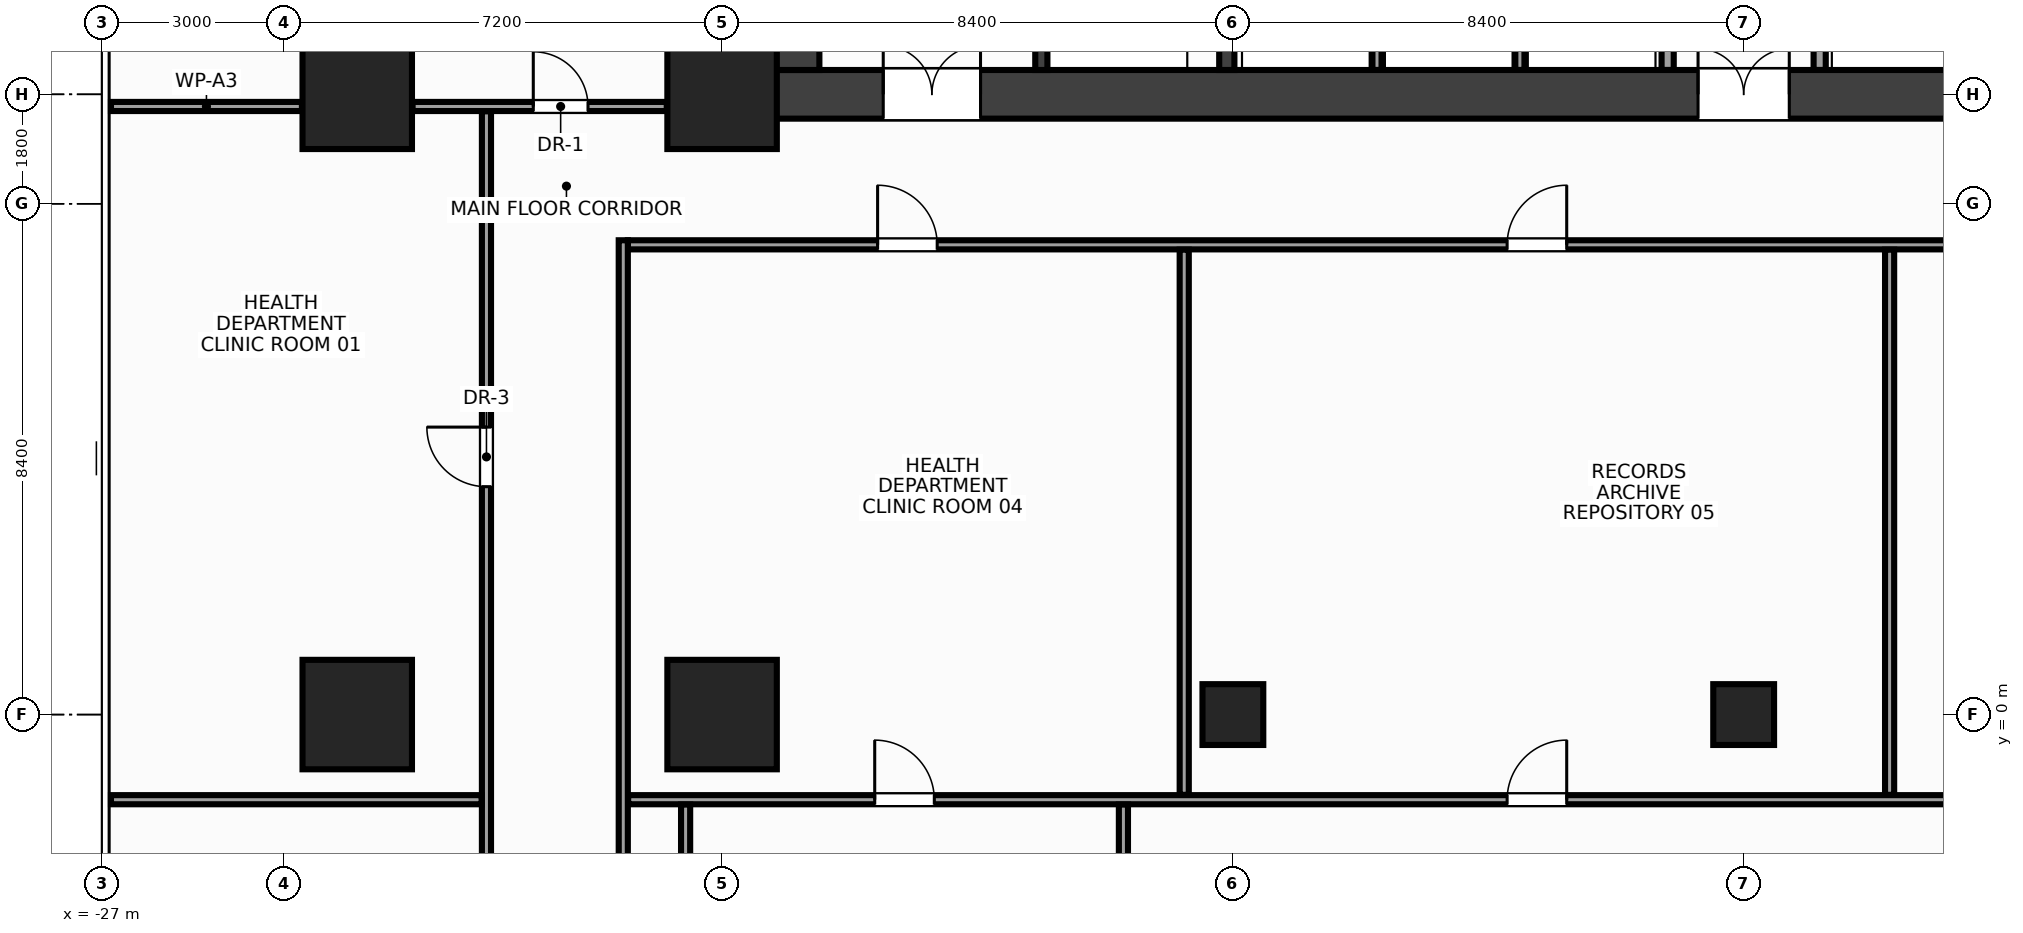
"""IFC4 building model, lengths in metres.
Left out: names, types, materials, properties, quantities, classifications, styles, units other than length and angle.
Written with IfcOpenShell. Run it as: python <this file> out.ifc"""

import sys

from ifc_helpers import new_model, si_unit, direction, frame, frame_2d, origin, origin_with_axes, origin_2d, place, context, subcontext, project, spatial, rectangle, hollow_rectangle, extrude, source, transform, mapped, element, fill, save


model = new_model("IFC4")
c1 = context("Model", 3, precision=1e-05, world=origin(), true_north=direction((0.0, 1.0)))
c2 = subcontext(c1, "Body", "Model", "MODEL_VIEW")
j1 = project(units=[si_unit("LENGTHUNIT", "METRE"), si_unit("PLANEANGLEUNIT", "RADIAN")], contexts=[c1])
p1 = place(None, origin())
s1 = spatial("IfcSite", under=j1, at=p1, CompositionType="ELEMENT")
p2 = place(p1, origin())
s2 = spatial("IfcBuilding", under=s1, at=p2, CompositionType="ELEMENT")
p3 = place(p2, frame((0.0, 0.0, 48.8)))
s3 = spatial("IfcBuildingStorey", under=s2, at=p3, CompositionType="ELEMENT", Elevation=48.8)
m1 = source(origin(), c2, "Body", "SweptSolid", [
    extrude(rectangle(XDim=32.0, YDim=0.8, at=frame_2d((16.0, 0.0))), origin(), (0.0, 0.0, 1.0), 3.6),
])
p4 = place(p3, frame((-16.0, 10.2, 0.0), z_axis=(0.0, 0.0, 1.0), x_axis=(1.0, 0.0, 0.0)))
e1 = element("IfcWall", 1, at=p4, inside=s3, PredefinedType="SHEAR", context=c2, shape_type="MappedRepresentation", body=[
    mapped(m1, transform((0.0, 0.0, 0.0), x_axis=(1.0, 0.0, 0.0), y_axis=(0.0, 1.0, 0.0), z_axis=(0.0, 0.0, 1.0), scale=1.0)),
])
p5 = place(p4, frame((1.85, 0.0, 0.0)))
e2 = element("IfcOpeningElement", 2, at=p5, cuts=e1, PredefinedType="OPENING", context=c2, shape_type="SweptSolid", body=[
    extrude(rectangle(XDim=1.6, YDim=2.15, at=frame_2d((0.8, 1.075))), frame((0.0, 0.412, 0.0), z_axis=(0.0, -1.0, 0.0), x_axis=(1.0, 0.0, 0.0)), (0.0, 0.0, 1.0), 0.824),
])
p6 = place(p4, frame((28.55, 0.0, 0.0)))
e3 = element("IfcOpeningElement", 3, at=p6, cuts=e1, PredefinedType="OPENING", context=c2, shape_type="SweptSolid", body=[
    extrude(rectangle(XDim=1.6, YDim=2.15, at=frame_2d((0.8, 1.075))), frame((0.0, 0.412, 0.0), z_axis=(0.0, -1.0, 0.0), x_axis=(1.0, 0.0, 0.0)), (0.0, 0.0, 1.0), 0.824),
])
p7 = place(p4, frame((15.25, 0.0, 0.0)))
e4 = element("IfcOpeningElement", 4, at=p7, cuts=e1, PredefinedType="OPENING", context=c2, shape_type="SweptSolid", body=[
    extrude(rectangle(XDim=1.5, YDim=2.2, at=frame_2d((0.75, 1.1))), frame((0.0, 0.412, 0.0), z_axis=(0.0, -1.0, 0.0), x_axis=(1.0, 0.0, 0.0)), (0.0, 0.0, 1.0), 0.824),
])
m2 = source(origin(), c2, "Body", "SweptSolid", [
    extrude(rectangle(XDim=12.8, YDim=0.8, at=frame_2d((6.4, 0.0))), origin(), (0.0, 0.0, 1.0), 3.6),
])
p8 = place(p3, frame((-15.6, 10.6, 0.0), z_axis=(0.0, 0.0, 1.0), x_axis=(0.0, 1.0, 0.0)))
e5 = element("IfcWall", 5, at=p8, inside=s3, PredefinedType="SHEAR", context=c2, shape_type="MappedRepresentation", body=[
    mapped(m2, transform((0.0, 0.0, 0.0), x_axis=(1.0, 0.0, 0.0), y_axis=(0.0, 1.0, 0.0), z_axis=(0.0, 0.0, 1.0), scale=1.0)),
])
m3 = source(origin(), c2, "Body", "SweptSolid", [
    extrude(rectangle(XDim=12.8, YDim=0.25, at=frame_2d((6.4, 0.0))), origin(), (0.0, 0.0, 1.0), 3.6),
])
p9 = place(p3, frame((-8.5, 10.6, 0.0), z_axis=(0.0, 0.0, 1.0), x_axis=(0.0, 1.0, 0.0)))
e6 = element("IfcWall", 6, at=p9, inside=s3, PredefinedType="SHEAR", context=c2, shape_type="MappedRepresentation", body=[
    mapped(m3, transform((0.0, 0.0, 0.0), x_axis=(1.0, 0.0, 0.0), y_axis=(0.0, 1.0, 0.0), z_axis=(0.0, 0.0, 1.0), scale=1.0)),
])
p10 = place(p9, frame((5.9, 0.0, 0.0)))
e7 = element("IfcOpeningElement", 7, at=p10, cuts=e6, PredefinedType="OPENING", context=c2, shape_type="SweptSolid", body=[
    extrude(rectangle(XDim=0.95, YDim=2.15, at=frame_2d((0.475, 1.075))), frame((0.0, 0.137, 0.0), z_axis=(0.0, -1.0, 0.0), x_axis=(1.0, 0.0, 0.0)), (0.0, 0.0, 1.0), 0.274),
])
m4 = source(origin(), c2, "Body", "SweptSolid", [
    extrude(rectangle(XDim=3.05, YDim=0.2, at=frame_2d((1.525, 0.0))), origin(), (0.0, 0.0, 1.0), 3.6),
])
p11 = place(p3, frame((-11.55, 10.6, 0.0), z_axis=(0.0, 0.0, 1.0), x_axis=(0.0, 1.0, 0.0)))
e8 = element("IfcWall", 8, at=p11, inside=s3, PredefinedType="SHEAR", context=c2, shape_type="MappedRepresentation", body=[
    mapped(m4, transform((0.0, 0.0, 0.0), x_axis=(1.0, 0.0, 0.0), y_axis=(0.0, 1.0, 0.0), z_axis=(0.0, 0.0, 1.0), scale=1.0)),
])
p12 = place(p11, frame((0.9, 0.0, 0.0)))
e9 = element("IfcOpeningElement", 9, at=p12, cuts=e8, PredefinedType="OPENING", context=c2, shape_type="SweptSolid", body=[
    extrude(rectangle(XDim=1.1, YDim=2.15, at=frame_2d((0.55, 1.075))), frame((0.0, 0.112, 0.0), z_axis=(0.0, -1.0, 0.0), x_axis=(1.0, 0.0, 0.0)), (0.0, 0.0, 1.0), 0.224),
])
m5 = source(origin(), c2, "Body", "SweptSolid", [
    extrude(rectangle(XDim=1.8, YDim=1.8, at=origin_2d()), origin(), (0.0, 0.0, 1.0), 3.6),
])
for number, where, z_axis, x_axis in (
    (10, (-16.8, 0.0, 0.0), (0.0, 0.0, 1.0), (1.0, 0.0, 0.0)),
    (11, (-16.8, 10.2, 0.0), (0.0, 0.0, 1.0), (1.0, 0.0, 0.0)),
    (12, (-22.8, 0.0, 0.0), (0.0, 0.0, 1.0), (1.0, 0.0, 0.0)),
    (13, (-22.8, 10.2, 0.0), (0.0, 0.0, 1.0), (1.0, 0.0, 0.0)),
):
    element("IfcColumn", number, at=place(p3, frame(where, z_axis=z_axis, x_axis=x_axis)), inside=s3, PredefinedType="COLUMN", context=c2, shape_type="MappedRepresentation", body=[
        mapped(m5, transform((0.0, 0.0, 0.0), x_axis=(1.0, 0.0, 0.0), y_axis=(0.0, 1.0, 0.0), z_axis=(0.0, 0.0, 1.0), scale=1.0)),
    ])
m6 = source(origin(), c2, "Body", "SweptSolid", [
    extrude(hollow_rectangle(XDim=1.0, YDim=1.0, WallThickness=0.045, at=origin_2d()), origin(), (0.0, 0.0, 1.0), 3.6),
])
p13 = place(p3, frame((-8.4, 0.0, 0.0), z_axis=(0.0, 0.0, 1.0), x_axis=(1.0, 0.0, 0.0)))
e14 = element("IfcColumn", 14, at=p13, inside=s3, PredefinedType="COLUMN", context=c2, shape_type="MappedRepresentation", body=[
    mapped(m6, transform((0.0, 0.0, 0.0), x_axis=(1.0, 0.0, 0.0), y_axis=(0.0, 1.0, 0.0), z_axis=(0.0, 0.0, 1.0), scale=1.0)),
])
m7 = source(origin(), c2, "Body", "SweptSolid", [
    extrude(rectangle(XDim=1.0, YDim=1.0, at=origin_2d()), origin(), (0.0, 0.0, 1.0), 3.6),
])
p14 = place(p3, origin_with_axes())
e15 = element("IfcColumn", 15, at=p14, inside=s3, PredefinedType="COLUMN", context=c2, shape_type="MappedRepresentation", body=[
    mapped(m7, transform((0.0, 0.0, 0.0), x_axis=(1.0, 0.0, 0.0), y_axis=(0.0, 1.0, 0.0), z_axis=(0.0, 0.0, 1.0), scale=1.0)),
])
m8 = source(origin(), c2, "Body", "SweptSolid", [
    extrude(rectangle(XDim=3.34, YDim=0.2, at=frame_2d((1.67, 0.0))), origin(), (0.0, 0.0, 1.0), 3.36),
])
for number, where, z_axis, x_axis in (
    (16, (-1.25, 10.6, 0.0), (0.0, 0.0, 1.0), (0.0, 1.0, 0.0)),
    (17, (1.25, 10.6, 0.0), (0.0, 0.0, 1.0), (0.0, 1.0, 0.0)),
):
    element("IfcWall", number, at=place(p3, frame(where, z_axis=z_axis, x_axis=x_axis)), inside=s3, PredefinedType="PARTITIONING", context=c2, shape_type="MappedRepresentation", body=[
        mapped(m8, transform((0.0, 0.0, 0.0), x_axis=(1.0, 0.0, 0.0), y_axis=(0.0, 1.0, 0.0), z_axis=(0.0, 0.0, 1.0), scale=1.0)),
    ])
m9 = source(origin(), c2, "Body", "SweptSolid", [
    extrude(rectangle(XDim=3.34, YDim=0.15, at=frame_2d((1.67, 0.0))), origin(), (0.0, 0.0, 1.0), 3.36),
])
for number, where, z_axis, x_axis in (
    (18, (-6.03, 10.6, 0.0), (0.0, 0.0, 1.0), (0.0, 1.0, 0.0)),
    (19, (-3.68, 10.6, 0.0), (0.0, 0.0, 1.0), (0.0, 1.0, 0.0)),
):
    element("IfcWall", number, at=place(p3, frame(where, z_axis=z_axis, x_axis=x_axis)), inside=s3, PredefinedType="PARTITIONING", context=c2, shape_type="MappedRepresentation", body=[
        mapped(m9, transform((0.0, 0.0, 0.0), x_axis=(1.0, 0.0, 0.0), y_axis=(0.0, 1.0, 0.0), z_axis=(0.0, 0.0, 1.0), scale=1.0)),
    ])
m10 = source(origin(), c2, "Body", "SweptSolid", [
    extrude(rectangle(XDim=3.14, YDim=0.15, at=frame_2d((1.57, 0.0))), origin(), (0.0, 0.0, 1.0), 2.435),
])
p15 = place(p3, frame((-26.85, 10.0, 0.0), z_axis=(0.0, 0.0, 1.0), x_axis=(1.0, 0.0, 0.0)))
e20 = element("IfcWall", 20, at=p15, inside=s3, PredefinedType="PARTITIONING", context=c2, shape_type="MappedRepresentation", body=[
    mapped(m10, transform((0.0, 0.0, 0.0), x_axis=(1.0, 0.0, 0.0), y_axis=(0.0, 1.0, 0.0), z_axis=(0.0, 0.0, 1.0), scale=1.0)),
])
m11 = source(origin(), c2, "Body", "SweptSolid", [
    extrude(rectangle(XDim=4.18, YDim=0.15, at=frame_2d((2.09, 0.0))), origin(), (0.0, 0.0, 1.0), 2.745),
])
p16 = place(p3, frame((-21.89, 10.0, 0.0), z_axis=(0.0, 0.0, 1.0), x_axis=(1.0, 0.0, 0.0)))
e21 = element("IfcWall", 21, at=p16, inside=s3, PredefinedType="PARTITIONING", context=c2, shape_type="MappedRepresentation", body=[
    mapped(m11, transform((0.0, 0.0, 0.0), x_axis=(1.0, 0.0, 0.0), y_axis=(0.0, 1.0, 0.0), z_axis=(0.0, 0.0, 1.0), scale=1.0)),
])
p17 = place(p16, frame((1.985, 0.0, 0.0)))
e22 = element("IfcOpeningElement", 22, at=p17, cuts=e21, PredefinedType="OPENING", context=c2, shape_type="SweptSolid", body=[
    extrude(rectangle(XDim=0.9, YDim=2.15, at=frame_2d((0.45, 1.075))), frame((0.0, 0.087, 0.0), z_axis=(0.0, -1.0, 0.0), x_axis=(1.0, 0.0, 0.0)), (0.0, 0.0, 1.0), 0.174),
])
m12 = source(origin(), c2, "Body", "SweptSolid", [
    extrude(rectangle(XDim=36.7, YDim=0.15, at=frame_2d((18.35, 0.0))), origin(), (0.0, 0.0, 1.0), 2.745),
])
p18 = place(p3, frame((-18.35, 7.725, 0.0), z_axis=(0.0, 0.0, 1.0), x_axis=(1.0, 0.0, 0.0)))
e23 = element("IfcWall", 23, at=p18, inside=s3, PredefinedType="PARTITIONING", context=c2, shape_type="MappedRepresentation", body=[
    mapped(m12, transform((0.0, 0.0, 0.0), x_axis=(1.0, 0.0, 0.0), y_axis=(0.0, 1.0, 0.0), z_axis=(0.0, 0.0, 1.0), scale=1.0)),
])
p19 = place(p18, frame((33.312, 0.0, 0.0)))
e24 = element("IfcOpeningElement", 24, at=p19, cuts=e23, PredefinedType="OPENING", context=c2, shape_type="SweptSolid", body=[
    extrude(rectangle(XDim=0.98, YDim=2.15, at=frame_2d((0.49, 1.075))), frame((0.0, 0.087, 0.0), z_axis=(0.0, -1.0, 0.0), x_axis=(1.0, 0.0, 0.0)), (0.0, 0.0, 1.0), 0.174),
])
p20 = place(p18, frame((4.107, 0.0, 0.0)))
e25 = element("IfcOpeningElement", 25, at=p20, cuts=e23, PredefinedType="OPENING", context=c2, shape_type="SweptSolid", body=[
    extrude(rectangle(XDim=0.98, YDim=2.15, at=frame_2d((0.49, 1.075))), frame((0.0, 0.087, 0.0), z_axis=(0.0, -1.0, 0.0), x_axis=(1.0, 0.0, 0.0)), (0.0, 0.0, 1.0), 0.174),
])
p21 = place(p18, frame((14.46, 0.0, 0.0)))
e26 = element("IfcOpeningElement", 26, at=p21, cuts=e23, PredefinedType="OPENING", context=c2, shape_type="SweptSolid", body=[
    extrude(rectangle(XDim=0.98, YDim=2.15, at=frame_2d((0.49, 1.075))), frame((0.0, 0.087, 0.0), z_axis=(0.0, -1.0, 0.0), x_axis=(1.0, 0.0, 0.0)), (0.0, 0.0, 1.0), 0.174),
])
p22 = place(p18, frame((25.36, 0.0, 0.0)))
e27 = element("IfcOpeningElement", 27, at=p22, cuts=e23, PredefinedType="OPENING", context=c2, shape_type="SweptSolid", body=[
    extrude(rectangle(XDim=0.98, YDim=2.15, at=frame_2d((0.49, 1.075))), frame((0.0, 0.087, 0.0), z_axis=(0.0, -1.0, 0.0), x_axis=(1.0, 0.0, 0.0)), (0.0, 0.0, 1.0), 0.174),
])
m13 = source(origin(), c2, "Body", "SweptSolid", [
    extrude(rectangle(XDim=24.115, YDim=0.15, at=frame_2d((12.058, 0.0))), origin(), (0.0, 0.0, 1.0), 2.745),
])
p23 = place(p3, frame((-20.675, -14.195, 0.0), z_axis=(0.0, 0.0, 1.0), x_axis=(0.0, 1.0, 0.0)))
e28 = element("IfcWall", 28, at=p23, inside=s3, PredefinedType="PARTITIONING", context=c2, shape_type="MappedRepresentation", body=[
    mapped(m13, transform((0.0, 0.0, 0.0), x_axis=(1.0, 0.0, 0.0), y_axis=(0.0, 1.0, 0.0), z_axis=(0.0, 0.0, 1.0), scale=1.0)),
])
p24 = place(p23, frame((17.942, 0.0, 0.0)))
e29 = element("IfcOpeningElement", 29, at=p24, cuts=e28, PredefinedType="OPENING", context=c2, shape_type="SweptSolid", body=[
    extrude(rectangle(XDim=0.98, YDim=2.15, at=frame_2d((0.49, 1.075))), frame((0.0, 0.087, 0.0), z_axis=(0.0, -1.0, 0.0), x_axis=(1.0, 0.0, 0.0)), (0.0, 0.0, 1.0), 0.174),
])
m14 = source(origin(), c2, "Body", "SweptSolid", [
    extrude(rectangle(XDim=21.995, YDim=0.15, at=frame_2d((10.998, 0.0))), origin(), (0.0, 0.0, 1.0), 2.745),
])
p25 = place(p3, frame((-18.425, -14.195, 0.0), z_axis=(0.0, 0.0, 1.0), x_axis=(0.0, 1.0, 0.0)))
e30 = element("IfcWall", 30, at=p25, inside=s3, PredefinedType="PARTITIONING", context=c2, shape_type="MappedRepresentation", body=[
    mapped(m14, transform((0.0, 0.0, 0.0), x_axis=(1.0, 0.0, 0.0), y_axis=(0.0, 1.0, 0.0), z_axis=(0.0, 0.0, 1.0), scale=1.0)),
])
m15 = source(origin(), c2, "Body", "SweptSolid", [
    extrude(rectangle(XDim=6.095, YDim=0.15, at=frame_2d((3.048, 0.0))), origin(), (0.0, 0.0, 1.0), 2.745),
])
p26 = place(p3, frame((-26.85, -1.4, 0.0), z_axis=(0.0, 0.0, 1.0), x_axis=(1.0, 0.0, 0.0)))
e31 = element("IfcWall", 31, at=p26, inside=s3, PredefinedType="PARTITIONING", context=c2, shape_type="MappedRepresentation", body=[
    mapped(m15, transform((0.0, 0.0, 0.0), x_axis=(1.0, 0.0, 0.0), y_axis=(0.0, 1.0, 0.0), z_axis=(0.0, 0.0, 1.0), scale=1.0)),
])
m16 = source(origin(), c2, "Body", "SweptSolid", [
    extrude(rectangle(XDim=36.69, YDim=0.15, at=frame_2d((18.345, 0.0))), origin(), (0.0, 0.0, 1.0), 2.745),
])
p27 = place(p3, frame((-18.345, -1.4, 0.0), z_axis=(0.0, 0.0, 1.0), x_axis=(1.0, 0.0, 0.0)))
e32 = element("IfcWall", 32, at=p27, inside=s3, PredefinedType="PARTITIONING", context=c2, shape_type="MappedRepresentation", body=[
    mapped(m16, transform((0.0, 0.0, 0.0), x_axis=(1.0, 0.0, 0.0), y_axis=(0.0, 1.0, 0.0), z_axis=(0.0, 0.0, 1.0), scale=1.0)),
])
p28 = place(p27, frame((14.455, 0.0, 0.0)))
e33 = element("IfcOpeningElement", 33, at=p28, cuts=e32, PredefinedType="OPENING", context=c2, shape_type="SweptSolid", body=[
    extrude(rectangle(XDim=0.98, YDim=2.15, at=frame_2d((0.49, 1.075))), frame((0.0, 0.087, 0.0), z_axis=(0.0, -1.0, 0.0), x_axis=(1.0, 0.0, 0.0)), (0.0, 0.0, 1.0), 0.174),
])
p29 = place(p27, frame((4.055, 0.0, 0.0)))
e34 = element("IfcOpeningElement", 34, at=p29, cuts=e32, PredefinedType="OPENING", context=c2, shape_type="SweptSolid", body=[
    extrude(rectangle(XDim=0.98, YDim=2.15, at=frame_2d((0.49, 1.075))), frame((0.0, 0.087, 0.0), z_axis=(0.0, -1.0, 0.0), x_axis=(1.0, 0.0, 0.0)), (0.0, 0.0, 1.0), 0.174),
])
p30 = place(p27, frame((32.415, 0.0, 0.0)))
e35 = element("IfcOpeningElement", 35, at=p30, cuts=e32, PredefinedType="OPENING", context=c2, shape_type="SweptSolid", body=[
    extrude(rectangle(XDim=0.98, YDim=2.15, at=frame_2d((0.49, 1.075))), frame((0.0, 0.087, 0.0), z_axis=(0.0, -1.0, 0.0), x_axis=(1.0, 0.0, 0.0)), (0.0, 0.0, 1.0), 0.174),
])
m17 = source(origin(), c2, "Body", "SweptSolid", [
    extrude(rectangle(XDim=8.965, YDim=0.15, at=frame_2d((4.482, 0.0))), origin(), (0.0, 0.0, 1.0), 2.645),
])
for number, where, z_axis, x_axis in (
    (36, (-9.2, -1.32, 0.0), (0.0, 0.0, 1.0), (0.0, 1.0, 0.0)),
    (37, (2.4, -1.32, 0.0), (0.0, 0.0, 1.0), (0.0, 1.0, 0.0)),
):
    element("IfcWall", number, at=place(p3, frame(where, z_axis=z_axis, x_axis=x_axis)), inside=s3, PredefinedType="PARTITIONING", context=c2, shape_type="MappedRepresentation", body=[
        mapped(m17, transform((0.0, 0.0, 0.0), x_axis=(1.0, 0.0, 0.0), y_axis=(0.0, 1.0, 0.0), z_axis=(0.0, 0.0, 1.0), scale=1.0)),
    ])
m18 = source(origin(), c2, "Body", "SweptSolid", [
    extrude(rectangle(XDim=8.41, YDim=0.15, at=frame_2d((4.205, 0.0))), origin(), (0.0, 0.0, 1.0), 3.36),
])
p31 = place(p3, frame((-17.4, -9.89, 0.0), z_axis=(0.0, 0.0, 1.0), x_axis=(0.0, 1.0, 0.0)))
e38 = element("IfcWall", 38, at=p31, inside=s3, PredefinedType="PARTITIONING", context=c2, shape_type="MappedRepresentation", body=[
    mapped(m18, transform((0.0, 0.0, 0.0), x_axis=(1.0, 0.0, 0.0), y_axis=(0.0, 1.0, 0.0), z_axis=(0.0, 0.0, 1.0), scale=1.0)),
])
m19 = source(origin(), c2, "Body", "SweptSolid", [
    extrude(rectangle(XDim=25.37, YDim=0.15, at=frame_2d((12.685, 0.0))), origin(), (0.0, 0.0, 1.0), 2.745),
])
p32 = place(p3, frame((-10.2, -26.85, 0.0), z_axis=(0.0, 0.0, 1.0), x_axis=(0.0, 1.0, 0.0)))
e39 = element("IfcWall", 39, at=p32, inside=s3, PredefinedType="PARTITIONING", context=c2, shape_type="MappedRepresentation", body=[
    mapped(m19, transform((0.0, 0.0, 0.0), x_axis=(1.0, 0.0, 0.0), y_axis=(0.0, 1.0, 0.0), z_axis=(0.0, 0.0, 1.0), scale=1.0)),
])
m20 = source(origin(), c2, "Body", "SweptSolid", [
    extrude(rectangle(XDim=1.6, YDim=2.15, at=frame_2d((0.8, 1.075))), frame((0.0, 0.025, 0.0), z_axis=(0.0, -1.0, 0.0), x_axis=(1.0, 0.0, 0.0)), (0.0, 0.0, 1.0), 0.05),
])
p33 = place(p5, origin())
e40 = element("IfcDoor", 40, at=p33, inside=s3, OperationType="DOUBLE_DOOR_SINGLE_SWING", PredefinedType="DOOR", context=c2, shape_type="MappedRepresentation", body=[
    mapped(m20, transform((0.0, 0.0, 0.0), x_axis=(1.0, 0.0, 0.0), y_axis=(0.0, 1.0, 0.0), z_axis=(0.0, 0.0, 1.0), scale=1.0)),
])
fill(e2, e40)
m21 = source(origin(), c2, "Body", "SweptSolid", [
    extrude(rectangle(XDim=1.5, YDim=2.2, at=frame_2d((0.75, 1.1))), frame((0.0, 0.025, 0.0), z_axis=(0.0, -1.0, 0.0), x_axis=(1.0, 0.0, 0.0)), (0.0, 0.0, 1.0), 0.05),
])
p34 = place(p7, origin())
e41 = element("IfcDoor", 41, at=p34, inside=s3, OperationType="DOUBLE_DOOR_SINGLE_SWING", PredefinedType="DOOR", context=c2, shape_type="MappedRepresentation", body=[
    mapped(m21, transform((0.0, 0.0, 0.0), x_axis=(1.0, 0.0, 0.0), y_axis=(0.0, 1.0, 0.0), z_axis=(0.0, 0.0, 1.0), scale=1.0)),
])
fill(e4, e41)
m22 = source(origin(), c2, "Body", "SweptSolid", [
    extrude(rectangle(XDim=0.9, YDim=2.15, at=frame_2d((0.45, 1.075))), frame((0.0, 0.025, 0.0), z_axis=(0.0, -1.0, 0.0), x_axis=(1.0, 0.0, 0.0)), (0.0, 0.0, 1.0), 0.05),
])
p35 = place(p17, origin())
e42 = element("IfcDoor", 42, at=p35, inside=s3, OperationType="SINGLE_SWING_LEFT", PredefinedType="DOOR", context=c2, shape_type="MappedRepresentation", body=[
    mapped(m22, transform((0.0, 0.0, 0.0), x_axis=(1.0, 0.0, 0.0), y_axis=(0.0, 1.0, 0.0), z_axis=(0.0, 0.0, 1.0), scale=1.0)),
])
fill(e22, e42)
m23 = source(origin(), c2, "Body", "SweptSolid", [
    extrude(rectangle(XDim=0.98, YDim=2.15, at=frame_2d((0.49, 1.075))), frame((0.0, 0.025, 0.0), z_axis=(0.0, -1.0, 0.0), x_axis=(1.0, 0.0, 0.0)), (0.0, 0.0, 1.0), 0.05),
])
p36 = place(p24, origin())
e43 = element("IfcDoor", 43, at=p36, inside=s3, OperationType="SINGLE_SWING_RIGHT", PredefinedType="DOOR", context=c2, shape_type="MappedRepresentation", body=[
    mapped(m23, transform((0.0, 0.0, 0.0), x_axis=(1.0, 0.0, 0.0), y_axis=(0.0, 1.0, 0.0), z_axis=(0.0, 0.0, 1.0), scale=1.0)),
])
fill(e29, e43)
p37 = place(p20, origin())
e44 = element("IfcDoor", 44, at=p37, inside=s3, OperationType="SINGLE_SWING_LEFT", PredefinedType="DOOR", context=c2, shape_type="MappedRepresentation", body=[
    mapped(m23, transform((0.0, 0.0, 0.0), x_axis=(1.0, 0.0, 0.0), y_axis=(0.0, 1.0, 0.0), z_axis=(0.0, 0.0, 1.0), scale=1.0)),
])
fill(e25, e44)
p38 = place(p21, origin())
e45 = element("IfcDoor", 45, at=p38, inside=s3, OperationType="SINGLE_SWING_RIGHT", PredefinedType="DOOR", context=c2, shape_type="MappedRepresentation", body=[
    mapped(m23, transform((0.0, 0.0, 0.0), x_axis=(1.0, 0.0, 0.0), y_axis=(0.0, 1.0, 0.0), z_axis=(0.0, 0.0, 1.0), scale=1.0)),
])
fill(e26, e45)
p39 = place(p28, origin())
e46 = element("IfcDoor", 46, at=p39, inside=s3, OperationType="SINGLE_SWING_RIGHT", PredefinedType="DOOR", context=c2, shape_type="MappedRepresentation", body=[
    mapped(m23, transform((0.0, 0.0, 0.0), x_axis=(1.0, 0.0, 0.0), y_axis=(0.0, 1.0, 0.0), z_axis=(0.0, 0.0, 1.0), scale=1.0)),
])
fill(e33, e46)
p40 = place(p29, origin())
e47 = element("IfcDoor", 47, at=p40, inside=s3, OperationType="SINGLE_SWING_LEFT", PredefinedType="DOOR", context=c2, shape_type="MappedRepresentation", body=[
    mapped(m23, transform((0.0, 0.0, 0.0), x_axis=(1.0, 0.0, 0.0), y_axis=(0.0, 1.0, 0.0), z_axis=(0.0, 0.0, 1.0), scale=1.0)),
])
fill(e34, e47)
save(model, sys.argv[1])
